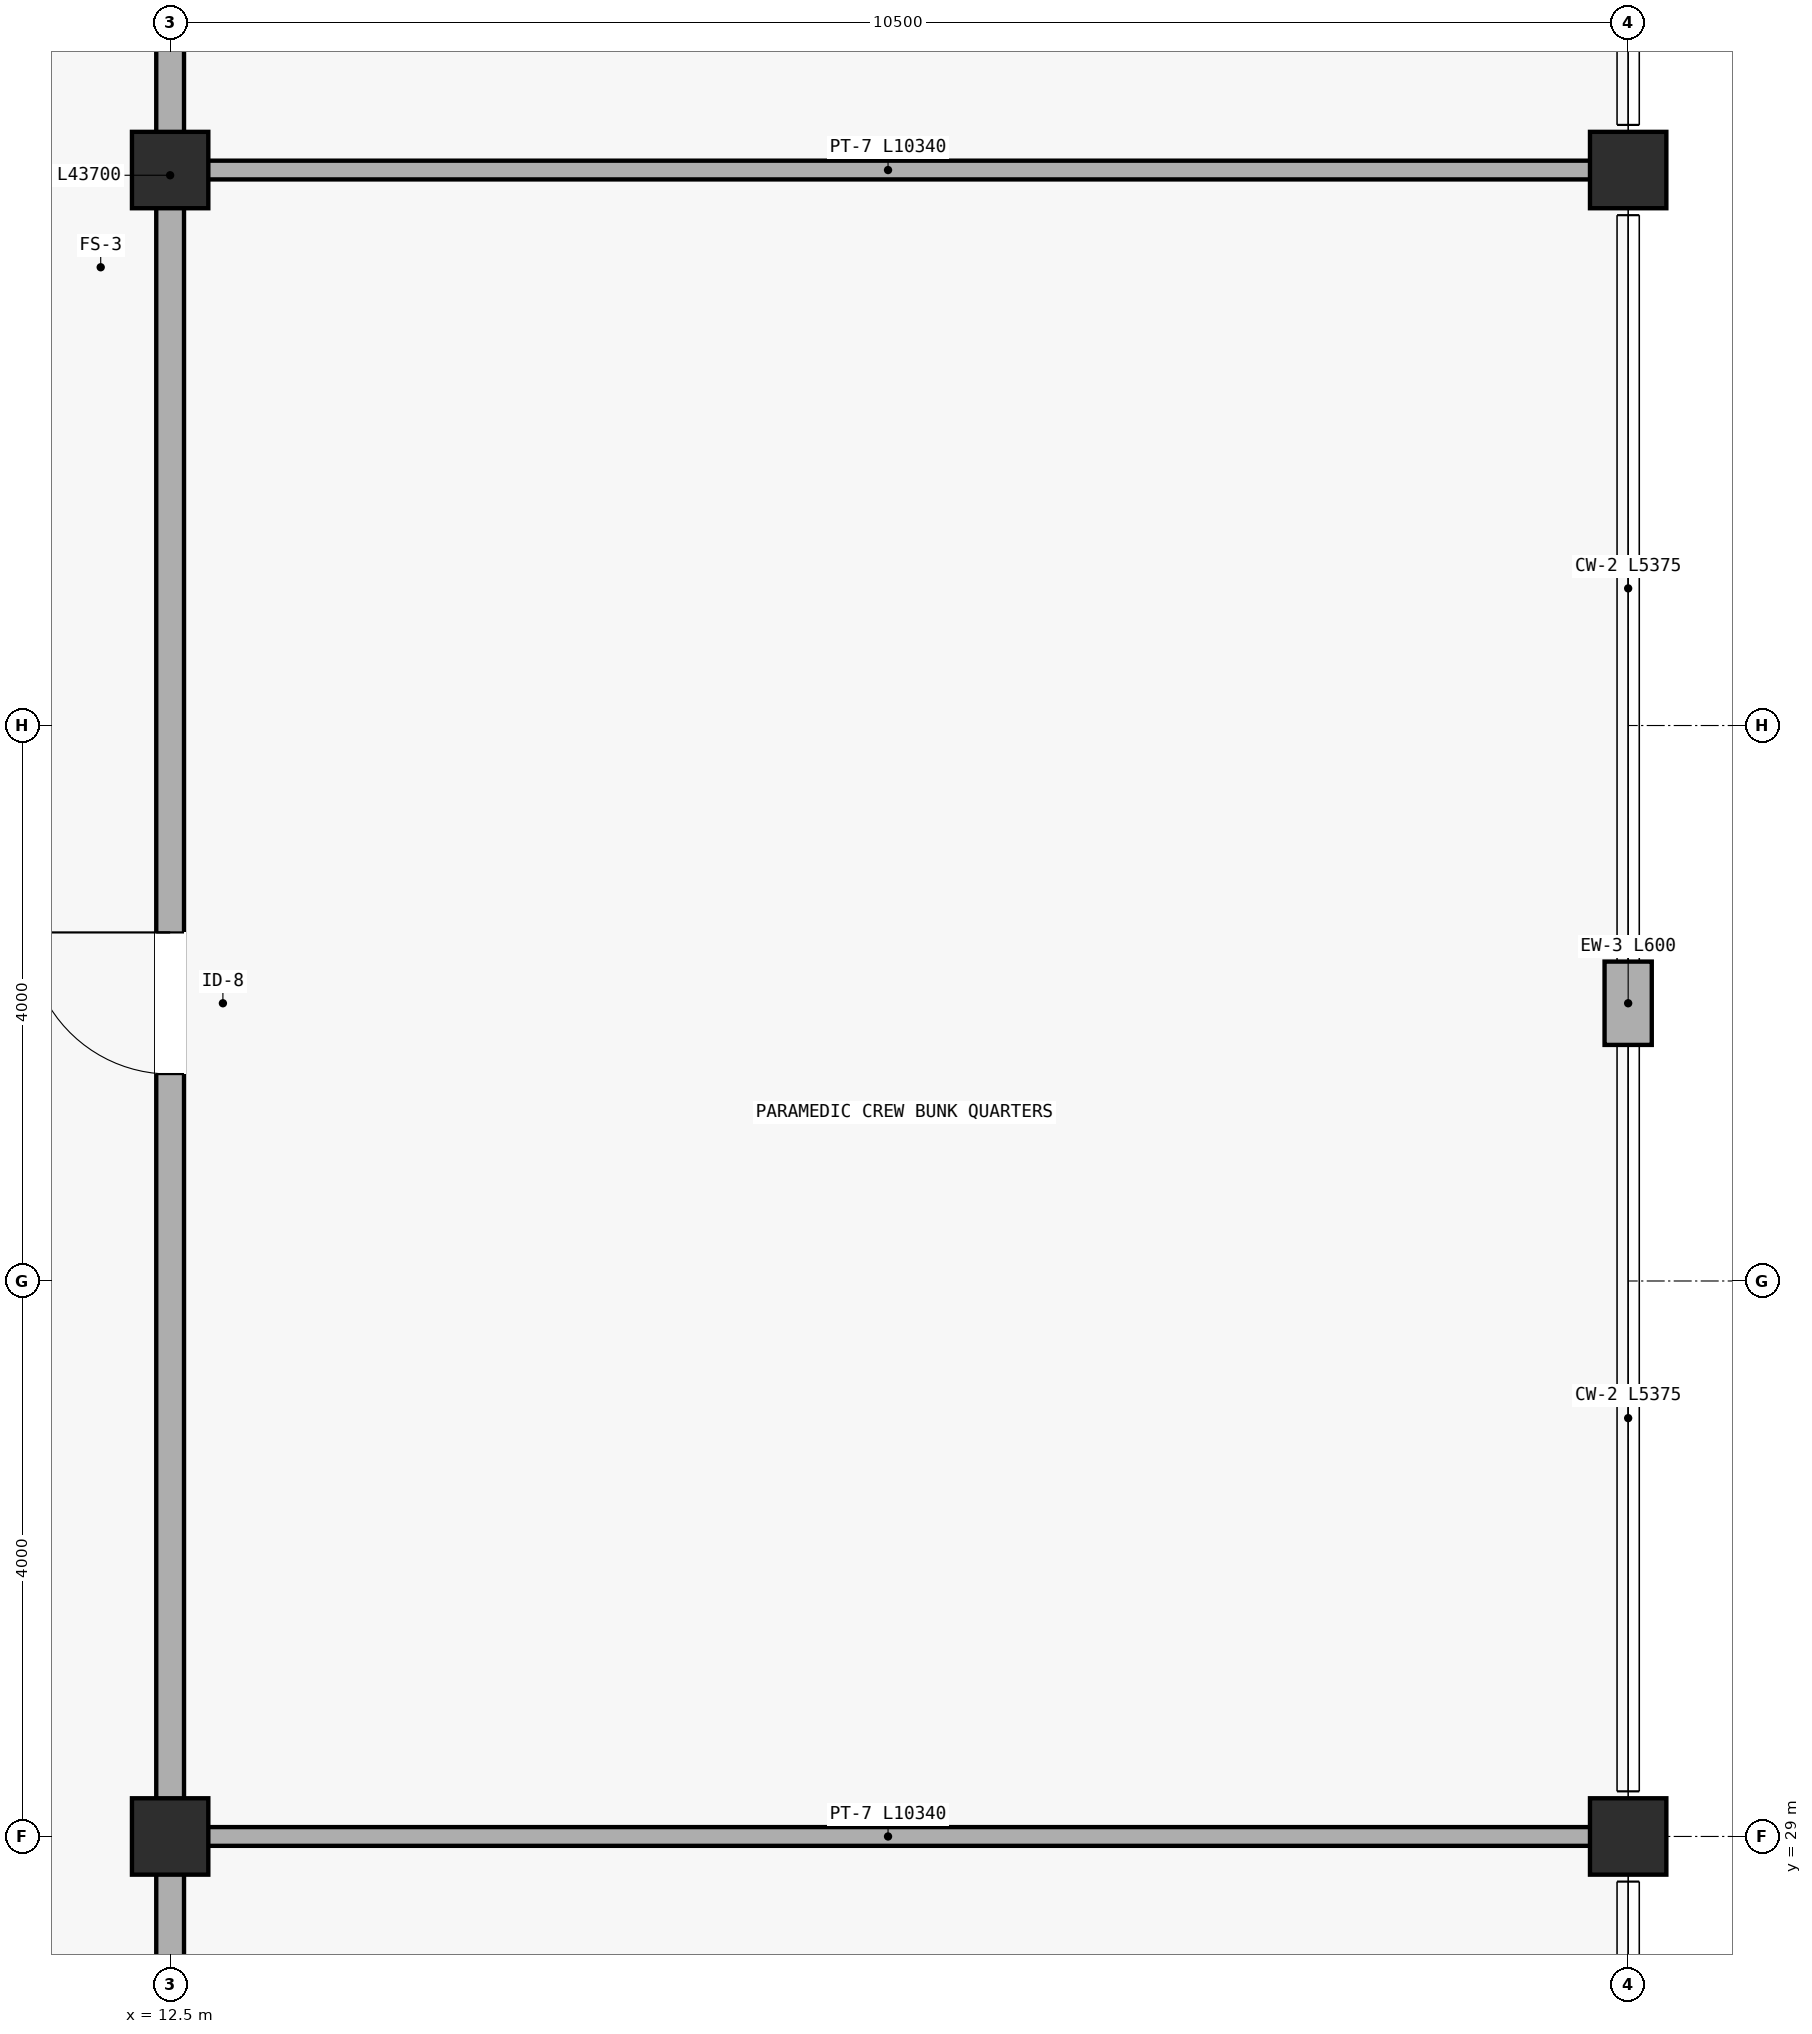
"""IFC4 building model, lengths in metres.
Left out: names, types, materials, properties, quantities, classifications, styles, units other than length and angle.
Written with IfcOpenShell. Run it as: python <this file> out.ifc"""

import sys

from ifc_helpers import new_model, si_unit, direction, frame, frame_2d, origin, origin_2d, place, context, subcontext, project, spatial, rectangle, extrude, element, fill, save


model = new_model("IFC4")
c1 = context("Model", 3, precision=1e-05, world=origin(), true_north=direction((0.0, 1.0)))
c2 = subcontext(c1, "Body", "Model", "MODEL_VIEW")
j1 = project(units=[si_unit("LENGTHUNIT", "METRE"), si_unit("PLANEANGLEUNIT", "RADIAN")], contexts=[c1])
p1 = place(None, origin())
s1 = spatial("IfcSite", under=j1, at=p1, CompositionType="ELEMENT")
p2 = place(p1, origin())
s2 = spatial("IfcBuilding", under=s1, at=p2, CompositionType="ELEMENT")
p3 = place(p2, frame((0.0, 0.0, 9.3)))
s3 = spatial("IfcBuildingStorey", under=s2, at=p3, CompositionType="ELEMENT", Elevation=9.3)
for number, where, z_axis, x_axis in (
    (1, (12.5, 29.0, 0.0), (0.0, 0.0, 1.0), (1.0, 0.0, 0.0)),
    (2, (12.5, 41.0, 0.0), (0.0, 0.0, 1.0), (1.0, 0.0, 0.0)),
    (3, (23.0, 29.0, 0.0), (0.0, 0.0, 1.0), (1.0, 0.0, 0.0)),
    (4, (23.0, 41.0, 0.0), (0.0, 0.0, 1.0), (1.0, 0.0, 0.0)),
):
    element("IfcColumn", number, at=place(p3, frame(where, z_axis=z_axis, x_axis=x_axis)), inside=s3, PredefinedType="COLUMN", context=c2, shape_type="SweptSolid", body=[
        extrude(rectangle(XDim=0.55, YDim=0.55, at=origin_2d()), origin(), (0.0, 0.0, 1.0), 3.45),
    ])
p4 = place(p3, frame((23.0, 34.7, 0.0), z_axis=(0.0, 0.0, 1.0), x_axis=(0.0, 1.0, 0.0)))
e5 = element("IfcWall", 5, at=p4, inside=s3, PredefinedType="STANDARD", context=c2, shape_type="SweptSolid", body=[
    extrude(rectangle(XDim=0.6, YDim=0.34, at=frame_2d((0.3, 0.0))), origin(), (0.0, 0.0, 1.0), 2.75),
])
p5 = place(p3, frame((12.5, 25.15, 0.0), z_axis=(0.0, 0.0, 1.0), x_axis=(0.0, 1.0, 0.0)))
e6 = element("IfcWall", 6, at=p5, inside=s3, PredefinedType="PARTITIONING", context=c2, shape_type="SweptSolid", body=[
    extrude(rectangle(XDim=3.85, YDim=0.2, at=frame_2d((1.925, 0.0))), origin(), (0.0, 0.0, 1.0), 2.7),
])
p6 = place(p5, frame((1.435, 0.0, 0.0)))
e7 = element("IfcOpeningElement", 7, at=p6, cuts=e6, PredefinedType="OPENING", context=c2, shape_type="SweptSolid", body=[
    extrude(rectangle(XDim=0.98, YDim=2.12, at=frame_2d((0.49, 1.06))), frame((0.0, 0.11, 0.0), z_axis=(0.0, -1.0, 0.0), x_axis=(1.0, 0.0, 0.0)), (0.0, 0.0, 1.0), 0.22),
])
p7 = place(p3, frame((12.5, 29.0, 0.0), z_axis=(0.0, 0.0, 1.0), x_axis=(0.0, 1.0, 0.0)))
e8 = element("IfcWall", 8, at=p7, inside=s3, PredefinedType="PARTITIONING", context=c2, shape_type="SweptSolid", body=[
    extrude(rectangle(XDim=12.0, YDim=0.2, at=frame_2d((6.0, 0.0))), origin(), (0.0, 0.0, 1.0), 2.7),
])
p8 = place(p7, frame((5.49, 0.0, 0.0)))
e9 = element("IfcOpeningElement", 9, at=p8, cuts=e8, PredefinedType="OPENING", context=c2, shape_type="SweptSolid", body=[
    extrude(rectangle(XDim=1.02, YDim=2.14, at=frame_2d((0.51, 1.07))), frame((0.0, 0.11, 0.0), z_axis=(0.0, -1.0, 0.0), x_axis=(1.0, 0.0, 0.0)), (0.0, 0.0, 1.0), 0.22),
])
p9 = place(p3, frame((12.5, 41.0, 0.0), z_axis=(0.0, 0.0, 1.0), x_axis=(0.0, 1.0, 0.0)))
e10 = element("IfcWall", 10, at=p9, inside=s3, PredefinedType="PARTITIONING", context=c2, shape_type="SweptSolid", body=[
    extrude(rectangle(XDim=11.85, YDim=0.2, at=frame_2d((5.925, 0.0))), origin(), (0.0, 0.0, 1.0), 2.7),
])
p10 = place(p9, frame((5.425, 0.0, 0.0)))
e11 = element("IfcOpeningElement", 11, at=p10, cuts=e10, PredefinedType="OPENING", context=c2, shape_type="SweptSolid", body=[
    extrude(rectangle(XDim=1.0, YDim=2.12, at=frame_2d((0.5, 1.06))), frame((0.0, 0.11, 0.0), z_axis=(0.0, -1.0, 0.0), x_axis=(1.0, 0.0, 0.0)), (0.0, 0.0, 1.0), 0.22),
])
for number, where, z_axis, x_axis in (
    (12, (12.5, 29.0, 0.0), (0.0, 0.0, 1.0), (1.0, 0.0, 0.0)),
    (13, (12.5, 41.0, 0.0), (0.0, 0.0, 1.0), (1.0, 0.0, 0.0)),
):
    element("IfcWall", number, at=place(p3, frame(where, z_axis=z_axis, x_axis=x_axis)), inside=s3, PredefinedType="PARTITIONING", context=c2, shape_type="SweptSolid", body=[
        extrude(rectangle(XDim=10.34, YDim=0.135, at=frame_2d((5.17, 0.0))), origin(), (0.0, 0.0, 1.0), 2.7),
    ])
p11 = place(p8, origin())
e14 = element("IfcDoor", 14, at=p11, inside=s3, OperationType="SINGLE_SWING_RIGHT", PredefinedType="DOOR", context=c2, shape_type="SweptSolid", body=[
    extrude(rectangle(XDim=1.02, YDim=2.14, at=frame_2d((0.51, 1.07))), frame((0.0, 0.025, 0.0), z_axis=(0.0, -1.0, 0.0), x_axis=(1.0, 0.0, 0.0)), (0.0, 0.0, 1.0), 0.05),
])
fill(e9, e14)
save(model, sys.argv[1])
